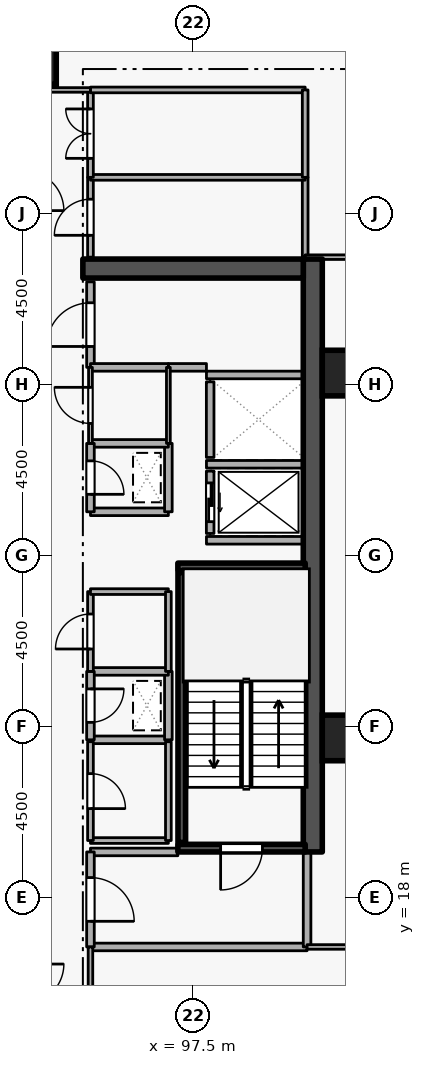
"""IFC4 building model, lengths in metres.
Left out: names, types, materials, properties, quantities, classifications, styles, units other than length and angle.
Written with IfcOpenShell. Run it as: python <this file> out.ifc"""

import sys

from ifc_helpers import new_model, si_unit, direction, frame, frame_2d, origin, origin_2d, place, context, subcontext, project, spatial, rectangle, extrude, element, fill, save


model = new_model("IFC4")
c1 = context("Model", 3, precision=1e-05, world=origin(), true_north=direction((0.0, 1.0)))
c2 = subcontext(c1, "Body", "Model", "MODEL_VIEW")
j1 = project(units=[si_unit("LENGTHUNIT", "METRE"), si_unit("PLANEANGLEUNIT", "RADIAN")], contexts=[c1])
p1 = place(None, origin())
s1 = spatial("IfcSite", under=j1, at=p1, CompositionType="ELEMENT")
p2 = place(p1, origin())
s2 = spatial("IfcBuilding", under=s1, at=p2, CompositionType="ELEMENT")
p3 = place(p2, frame((0.0, 0.0, 134.1)))
s3 = spatial("IfcBuildingStorey", under=s2, at=p3, CompositionType="ELEMENT", Elevation=134.1)
p4 = place(p3, frame((100.65, 19.2, 0.0), z_axis=(0.0, 0.0, 1.0), x_axis=(0.0, 1.0, 0.0)))
e1 = element("IfcWall", 1, at=p4, inside=s3, PredefinedType="SHEAR", context=c2, shape_type="SweptSolid", body=[
    extrude(rectangle(XDim=15.6, YDim=0.5, at=frame_2d((7.8, 0.0))), origin(), (0.0, 0.0, 1.0), 3.6),
])
p5 = place(p3, frame((94.6, 34.55, 0.0), z_axis=(0.0, 0.0, 1.0), x_axis=(1.0, 0.0, 0.0)))
e2 = element("IfcWall", 2, at=p5, inside=s3, PredefinedType="SHEAR", context=c2, shape_type="SweptSolid", body=[
    extrude(rectangle(XDim=5.8, YDim=0.5, at=frame_2d((2.9, 0.0))), origin(), (0.0, 0.0, 1.0), 3.6),
])
for number, where, z_axis, x_axis in (
    (3, (93.3, 40.0, 0.0), (0.0, 0.0, 1.0), (1.0, 0.0, 0.0)),
    (4, (101.5, 22.2, 0.0), (0.0, 0.0, 1.0), (1.0, 0.0, 0.0)),
    (5, (101.5, 31.8, 0.0), (0.0, 0.0, 1.0), (1.0, 0.0, 0.0)),
):
    element("IfcColumn", number, at=place(p3, frame(where, z_axis=z_axis, x_axis=x_axis)), inside=s3, PredefinedType="COLUMN", context=c2, shape_type="SweptSolid", body=[
        extrude(rectangle(XDim=1.2, YDim=1.2, at=origin_2d()), origin(), (0.0, 0.0, 1.0), 3.6),
    ])
p6 = place(p3, frame((97.95, 29.22, 0.0), z_axis=(0.0, 0.0, 1.0), x_axis=(0.0, -1.0, 0.0)))
e6 = element("IfcWall", 6, at=p6, inside=s3, PredefinedType="STANDARD", context=c2, shape_type="SweptSolid", body=[
    extrude(rectangle(XDim=1.64, YDim=0.2, at=frame_2d((0.82, 0.0))), origin(), (0.0, 0.0, 1.0), 3.34),
])
p7 = place(p6, frame((0.31, 0.0, 0.0)))
e7 = element("IfcOpeningElement", 7, at=p7, cuts=e6, PredefinedType="OPENING", context=c2, shape_type="SweptSolid", body=[
    extrude(rectangle(XDim=1.02, YDim=2.06, at=frame_2d((0.51, 1.03))), frame((0.0, 0.11, 0.0), z_axis=(0.0, -1.0, 0.0), x_axis=(1.0, 0.0, 0.0)), (0.0, 0.0, 1.0), 0.22),
])
p8 = place(p3, frame((97.95, 31.57, 0.0), z_axis=(0.0, 0.0, 1.0), x_axis=(0.0, -1.0, 0.0)))
e8 = element("IfcWall", 8, at=p8, inside=s3, PredefinedType="STANDARD", context=c2, shape_type="SweptSolid", body=[
    extrude(rectangle(XDim=1.99, YDim=0.2, at=frame_2d((0.995, 0.0))), origin(), (0.0, 0.0, 1.0), 3.34),
])
for number, where, z_axis, x_axis in (
    (9, (97.852, 29.4, 0.0), (0.0, 0.0, 1.0), (1.0, 0.0, 0.0)),
    (10, (97.852, 27.4, 0.0), (0.0, 0.0, 1.0), (1.0, 0.0, 0.0)),
    (11, (97.852, 31.75, 0.0), (0.0, 0.0, 1.0), (1.0, 0.0, 0.0)),
):
    element("IfcWall", number, at=place(p3, frame(where, z_axis=z_axis, x_axis=x_axis)), inside=s3, PredefinedType="STANDARD", context=c2, shape_type="SweptSolid", body=[
        extrude(rectangle(XDim=2.536, YDim=0.2, at=frame_2d((1.268, 0.0))), origin(), (0.0, 0.0, 1.0), 3.34),
    ])
p9 = place(p3, frame((100.45, 19.3, 0.0), z_axis=(0.0, 0.0, 1.0), x_axis=(-1.0, 0.0, 0.0)))
e12 = element("IfcWall", 12, at=p9, inside=s3, PredefinedType="SHEAR", context=c2, shape_type="SweptSolid", body=[
    extrude(rectangle(XDim=3.35, YDim=0.2, at=frame_2d((1.675, 0.0))), origin(), (0.0, 0.0, 1.0), 3.6),
])
p10 = place(p9, frame((1.125, 0.0, 0.0)))
e13 = element("IfcOpeningElement", 13, at=p10, cuts=e12, PredefinedType="OPENING", context=c2, shape_type="SweptSolid", body=[
    extrude(rectangle(XDim=1.1, YDim=2.1, at=frame_2d((0.55, 1.05))), frame((0.0, 0.11, 0.0), z_axis=(0.0, -1.0, 0.0), x_axis=(1.0, 0.0, 0.0)), (0.0, 0.0, 1.0), 0.22),
])
p11 = place(p3, frame((97.1, 26.7, 0.0), z_axis=(0.0, 0.0, 1.0), x_axis=(1.0, 0.0, 0.0)))
e14 = element("IfcWall", 14, at=p11, inside=s3, PredefinedType="SHEAR", context=c2, shape_type="SweptSolid", body=[
    extrude(rectangle(XDim=3.35, YDim=0.2, at=frame_2d((1.675, 0.0))), origin(), (0.0, 0.0, 1.0), 3.6),
])
p12 = place(p3, frame((97.203, 26.55, 0.0), z_axis=(0.0, 0.0, 1.0), x_axis=(0.0, -1.0, 0.0)))
e15 = element("IfcWall", 15, at=p12, inside=s3, PredefinedType="SHEAR", context=c2, shape_type="SweptSolid", body=[
    extrude(rectangle(XDim=7.1, YDim=0.2, at=frame_2d((3.55, 0.0))), origin(), (0.0, 0.0, 1.0), 3.6),
])
p13 = place(p3, frame((94.8, 16.7, 0.0), z_axis=(0.0, 0.0, 1.0), x_axis=(1.0, 0.0, 0.0)))
e16 = element("IfcWall", 16, at=p13, inside=s3, PredefinedType="STANDARD", context=c2, shape_type="SweptSolid", body=[
    extrude(rectangle(XDim=5.7, YDim=0.2, at=frame_2d((2.85, 0.0))), origin(), (0.0, 0.0, 1.0), 3.34),
])
p14 = place(p3, frame((100.5, 16.7, 0.0), z_axis=(0.0, 0.0, 1.0), x_axis=(0.0, 1.0, 0.0)))
e17 = element("IfcWall", 17, at=p14, inside=s3, PredefinedType="STANDARD", context=c2, shape_type="SweptSolid", body=[
    extrude(rectangle(XDim=2.5, YDim=0.2, at=frame_2d((1.25, 0.0))), origin(), (0.0, 0.0, 1.0), 3.34),
])
p15 = place(p3, frame((97.1, 19.2, 0.0), z_axis=(0.0, 0.0, 1.0), x_axis=(-1.0, 0.0, 0.0)))
e18 = element("IfcWall", 18, at=p15, inside=s3, PredefinedType="STANDARD", context=c2, shape_type="SweptSolid", body=[
    extrude(rectangle(XDim=2.3, YDim=0.2, at=frame_2d((1.15, 0.0))), origin(), (0.0, 0.0, 1.0), 2.545),
])
p16 = place(p3, frame((94.8, 19.2, 0.0), z_axis=(0.0, 0.0, 1.0), x_axis=(0.0, -1.0, 0.0)))
e19 = element("IfcWall", 19, at=p16, inside=s3, PredefinedType="STANDARD", context=c2, shape_type="SweptSolid", body=[
    extrude(rectangle(XDim=2.5, YDim=0.2, at=frame_2d((1.25, 0.0))), origin(), (0.0, 0.0, 1.0), 3.34),
])
p17 = place(p16, frame((0.675, 0.0, 0.0)))
e20 = element("IfcOpeningElement", 20, at=p17, cuts=e19, PredefinedType="OPENING", context=c2, shape_type="SweptSolid", body=[
    extrude(rectangle(XDim=1.15, YDim=2.1, at=frame_2d((0.575, 1.05))), frame((0.0, 0.11, 0.0), z_axis=(0.0, -1.0, 0.0), x_axis=(1.0, 0.0, 0.0)), (0.0, 0.0, 1.0), 0.22),
])
p18 = place(p3, frame((94.8, 28.15, 0.0), z_axis=(0.0, 0.0, 1.0), x_axis=(1.0, 0.0, 0.0)))
e21 = element("IfcWall", 21, at=p18, inside=s3, PredefinedType="STANDARD", context=c2, shape_type="SweptSolid", body=[
    extrude(rectangle(XDim=2.05, YDim=0.2, at=frame_2d((1.025, 0.0))), origin(), (0.0, 0.0, 1.0), 3.34),
])
p19 = place(p3, frame((96.85, 28.15, 0.0), z_axis=(0.0, 0.0, 1.0), x_axis=(0.0, 1.0, 0.0)))
e22 = element("IfcWall", 22, at=p19, inside=s3, PredefinedType="STANDARD", context=c2, shape_type="SweptSolid", body=[
    extrude(rectangle(XDim=1.8, YDim=0.2, at=frame_2d((0.9, 0.0))), origin(), (0.0, 0.0, 1.0), 3.34),
])
p20 = place(p3, frame((96.85, 29.95, 0.0), z_axis=(0.0, 0.0, 1.0), x_axis=(-1.0, 0.0, 0.0)))
e23 = element("IfcWall", 23, at=p20, inside=s3, PredefinedType="STANDARD", context=c2, shape_type="SweptSolid", body=[
    extrude(rectangle(XDim=2.05, YDim=0.2, at=frame_2d((1.025, 0.0))), origin(), (0.0, 0.0, 1.0), 3.34),
])
p21 = place(p3, frame((94.8, 29.95, 0.0), z_axis=(0.0, 0.0, 1.0), x_axis=(0.0, -1.0, 0.0)))
e24 = element("IfcWall", 24, at=p21, inside=s3, PredefinedType="STANDARD", context=c2, shape_type="SweptSolid", body=[
    extrude(rectangle(XDim=1.8, YDim=0.2, at=frame_2d((0.9, 0.0))), origin(), (0.0, 0.0, 1.0), 3.34),
])
p22 = place(p21, frame((0.46, 0.0, 0.0)))
e25 = element("IfcOpeningElement", 25, at=p22, cuts=e24, PredefinedType="OPENING", context=c2, shape_type="SweptSolid", body=[
    extrude(rectangle(XDim=0.88, YDim=2.04, at=frame_2d((0.44, 1.02))), frame((0.0, 0.11, 0.0), z_axis=(0.0, -1.0, 0.0), x_axis=(1.0, 0.0, 0.0)), (0.0, 0.0, 1.0), 0.22),
])
p23 = place(p3, frame((94.8, 22.15, 0.0), z_axis=(0.0, 0.0, 1.0), x_axis=(1.0, 0.0, 0.0)))
e26 = element("IfcWall", 26, at=p23, inside=s3, PredefinedType="STANDARD", context=c2, shape_type="SweptSolid", body=[
    extrude(rectangle(XDim=2.05, YDim=0.2, at=frame_2d((1.025, 0.0))), origin(), (0.0, 0.0, 1.0), 3.34),
])
p24 = place(p3, frame((96.85, 22.15, 0.0), z_axis=(0.0, 0.0, 1.0), x_axis=(0.0, 1.0, 0.0)))
e27 = element("IfcWall", 27, at=p24, inside=s3, PredefinedType="STANDARD", context=c2, shape_type="SweptSolid", body=[
    extrude(rectangle(XDim=1.8, YDim=0.2, at=frame_2d((0.9, 0.0))), origin(), (0.0, 0.0, 1.0), 3.34),
])
p25 = place(p3, frame((96.85, 23.95, 0.0), z_axis=(0.0, 0.0, 1.0), x_axis=(-1.0, 0.0, 0.0)))
e28 = element("IfcWall", 28, at=p25, inside=s3, PredefinedType="STANDARD", context=c2, shape_type="SweptSolid", body=[
    extrude(rectangle(XDim=2.05, YDim=0.2, at=frame_2d((1.025, 0.0))), origin(), (0.0, 0.0, 1.0), 3.34),
])
p26 = place(p3, frame((94.8, 23.95, 0.0), z_axis=(0.0, 0.0, 1.0), x_axis=(0.0, -1.0, 0.0)))
e29 = element("IfcWall", 29, at=p26, inside=s3, PredefinedType="STANDARD", context=c2, shape_type="SweptSolid", body=[
    extrude(rectangle(XDim=1.8, YDim=0.2, at=frame_2d((0.9, 0.0))), origin(), (0.0, 0.0, 1.0), 3.34),
])
p27 = place(p26, frame((0.46, 0.0, 0.0)))
e30 = element("IfcOpeningElement", 30, at=p27, cuts=e29, PredefinedType="OPENING", context=c2, shape_type="SweptSolid", body=[
    extrude(rectangle(XDim=0.88, YDim=2.04, at=frame_2d((0.44, 1.02))), frame((0.0, 0.11, 0.0), z_axis=(0.0, -1.0, 0.0), x_axis=(1.0, 0.0, 0.0)), (0.0, 0.0, 1.0), 0.22),
])
p28 = place(p3, frame((94.8, 31.95, 0.0), z_axis=(0.0, 0.0, 1.0), x_axis=(0.0, 1.0, 0.0)))
e31 = element("IfcWall", 31, at=p28, inside=s3, PredefinedType="STANDARD", context=c2, shape_type="SweptSolid", body=[
    extrude(rectangle(XDim=2.25, YDim=0.2, at=frame_2d((1.125, 0.0))), origin(), (0.0, 0.0, 1.0), 3.34),
])
p29 = place(p28, frame((0.55, 0.0, 0.0)))
e32 = element("IfcOpeningElement", 32, at=p29, cuts=e31, PredefinedType="OPENING", context=c2, shape_type="SweptSolid", body=[
    extrude(rectangle(XDim=1.15, YDim=2.1, at=frame_2d((0.575, 1.05))), frame((0.0, 0.11, 0.0), z_axis=(0.0, -1.0, 0.0), x_axis=(1.0, 0.0, 0.0)), (0.0, 0.0, 1.0), 0.22),
])
p30 = place(p3, frame((97.852, 31.95, 0.0), z_axis=(0.0, 0.0, 1.0), x_axis=(-1.0, 0.0, 0.0)))
e33 = element("IfcWall", 33, at=p30, inside=s3, PredefinedType="STANDARD", context=c2, shape_type="SweptSolid", body=[
    extrude(rectangle(XDim=1.002, YDim=0.2, at=frame_2d((0.501, 0.0))), origin(), (0.0, 0.0, 1.0), 3.34),
])
p31 = place(p3, frame((96.85, 31.95, 0.0), z_axis=(0.0, 0.0, 1.0), x_axis=(-1.0, 0.0, 0.0)))
e34 = element("IfcWall", 34, at=p31, inside=s3, PredefinedType="STANDARD", context=c2, shape_type="SweptSolid", body=[
    extrude(rectangle(XDim=2.05, YDim=0.2, at=frame_2d((1.025, 0.0))), origin(), (0.0, 0.0, 1.0), 3.34),
])
p32 = place(p3, frame((94.8, 19.5, 0.0), z_axis=(0.0, 0.0, 1.0), x_axis=(1.0, 0.0, 0.0)))
e35 = element("IfcWall", 35, at=p32, inside=s3, PredefinedType="PARTITIONING", context=c2, shape_type="SweptSolid", body=[
    extrude(rectangle(XDim=2.05, YDim=0.15, at=frame_2d((1.025, 0.0))), origin(), (0.0, 0.0, 1.0), 2.545),
])
p33 = place(p3, frame((96.85, 19.5, 0.0), z_axis=(0.0, 0.0, 1.0), x_axis=(0.0, 1.0, 0.0)))
e36 = element("IfcWall", 36, at=p33, inside=s3, PredefinedType="PARTITIONING", context=c2, shape_type="SweptSolid", body=[
    extrude(rectangle(XDim=2.6, YDim=0.15, at=frame_2d((1.3, 0.0))), origin(), (0.0, 0.0, 1.0), 3.34),
])
p34 = place(p3, frame((94.8, 22.1, 0.0), z_axis=(0.0, 0.0, 1.0), x_axis=(0.0, -1.0, 0.0)))
e37 = element("IfcWall", 37, at=p34, inside=s3, PredefinedType="PARTITIONING", context=c2, shape_type="SweptSolid", body=[
    extrude(rectangle(XDim=2.6, YDim=0.15, at=frame_2d((1.3, 0.0))), origin(), (0.0, 0.0, 1.0), 3.34),
])
p35 = place(p34, frame((0.84, 0.0, 0.0)))
e38 = element("IfcOpeningElement", 38, at=p35, cuts=e37, PredefinedType="OPENING", context=c2, shape_type="SweptSolid", body=[
    extrude(rectangle(XDim=0.92, YDim=2.08, at=frame_2d((0.46, 1.04))), frame((0.0, 0.085, 0.0), z_axis=(0.0, -1.0, 0.0), x_axis=(1.0, 0.0, 0.0)), (0.0, 0.0, 1.0), 0.17),
])
p36 = place(p3, frame((94.8, 23.95, 0.0), z_axis=(0.0, 0.0, 1.0), x_axis=(0.0, 1.0, 0.0)))
e39 = element("IfcWall", 39, at=p36, inside=s3, PredefinedType="PARTITIONING", context=c2, shape_type="SweptSolid", body=[
    extrude(rectangle(XDim=2.1, YDim=0.15, at=frame_2d((1.05, 0.0))), origin(), (0.0, 0.0, 1.0), 3.34),
])
p37 = place(p36, frame((0.59, 0.0, 0.0)))
e40 = element("IfcOpeningElement", 40, at=p37, cuts=e39, PredefinedType="OPENING", context=c2, shape_type="SweptSolid", body=[
    extrude(rectangle(XDim=0.92, YDim=2.08, at=frame_2d((0.46, 1.04))), frame((0.0, 0.085, 0.0), z_axis=(0.0, -1.0, 0.0), x_axis=(1.0, 0.0, 0.0)), (0.0, 0.0, 1.0), 0.17),
])
p38 = place(p3, frame((94.8, 26.05, 0.0), z_axis=(0.0, 0.0, 1.0), x_axis=(1.0, 0.0, 0.0)))
e41 = element("IfcWall", 41, at=p38, inside=s3, PredefinedType="PARTITIONING", context=c2, shape_type="SweptSolid", body=[
    extrude(rectangle(XDim=2.05, YDim=0.15, at=frame_2d((1.025, 0.0))), origin(), (0.0, 0.0, 1.0), 3.34),
])
p39 = place(p3, frame((96.85, 26.05, 0.0), z_axis=(0.0, 0.0, 1.0), x_axis=(0.0, -1.0, 0.0)))
e42 = element("IfcWall", 42, at=p39, inside=s3, PredefinedType="PARTITIONING", context=c2, shape_type="SweptSolid", body=[
    extrude(rectangle(XDim=2.1, YDim=0.15, at=frame_2d((1.05, 0.0))), origin(), (0.0, 0.0, 1.0), 3.34),
])
p40 = place(p3, frame((94.8, 29.95, 0.0), z_axis=(0.0, 0.0, 1.0), x_axis=(0.0, 1.0, 0.0)))
e43 = element("IfcWall", 43, at=p40, inside=s3, PredefinedType="PARTITIONING", context=c2, shape_type="SweptSolid", body=[
    extrude(rectangle(XDim=2.0, YDim=0.1, at=frame_2d((1.0, 0.0))), origin(), (0.0, 0.0, 1.0), 3.34),
])
p41 = place(p40, frame((0.525, 0.0, 0.0)))
e44 = element("IfcOpeningElement", 44, at=p41, cuts=e43, PredefinedType="OPENING", context=c2, shape_type="SweptSolid", body=[
    extrude(rectangle(XDim=0.95, YDim=2.1, at=frame_2d((0.475, 1.05))), frame((0.0, 0.06, 0.0), z_axis=(0.0, -1.0, 0.0), x_axis=(1.0, 0.0, 0.0)), (0.0, 0.0, 1.0), 0.12),
])
p42 = place(p3, frame((96.85, 31.95, 0.0), z_axis=(0.0, 0.0, 1.0), x_axis=(0.0, -1.0, 0.0)))
e45 = element("IfcWall", 45, at=p42, inside=s3, PredefinedType="PARTITIONING", context=c2, shape_type="SweptSolid", body=[
    extrude(rectangle(XDim=2.0, YDim=0.1, at=frame_2d((1.0, 0.0))), origin(), (0.0, 0.0, 1.0), 3.34),
])
p43 = place(p3, frame((100.45, 36.95, 0.0), z_axis=(0.0, 0.0, 1.0), x_axis=(0.0, -1.0, 0.0)))
e46 = element("IfcWall", 46, at=p43, inside=s3, PredefinedType="PARTITIONING", context=c2, shape_type="SweptSolid", body=[
    extrude(rectangle(XDim=2.1, YDim=0.15, at=frame_2d((1.05, 0.0))), origin(), (0.0, 0.0, 1.0), 3.34),
])
p44 = place(p3, frame((94.8, 34.85, 0.0), z_axis=(0.0, 0.0, 1.0), x_axis=(0.0, 1.0, 0.0)))
e47 = element("IfcWall", 47, at=p44, inside=s3, PredefinedType="PARTITIONING", context=c2, shape_type="SweptSolid", body=[
    extrude(rectangle(XDim=2.1, YDim=0.15, at=frame_2d((1.05, 0.0))), origin(), (0.0, 0.0, 1.0), 3.34),
])
p45 = place(p44, frame((0.575, 0.0, 0.0)))
e48 = element("IfcOpeningElement", 48, at=p45, cuts=e47, PredefinedType="OPENING", context=c2, shape_type="SweptSolid", body=[
    extrude(rectangle(XDim=0.95, YDim=2.1, at=frame_2d((0.475, 1.05))), frame((0.0, 0.085, 0.0), z_axis=(0.0, -1.0, 0.0), x_axis=(1.0, 0.0, 0.0)), (0.0, 0.0, 1.0), 0.17),
])
p46 = place(p3, frame((94.8, 36.95, 0.0), z_axis=(0.0, 0.0, 1.0), x_axis=(1.0, 0.0, 0.0)))
e49 = element("IfcWall", 49, at=p46, inside=s3, PredefinedType="PARTITIONING", context=c2, shape_type="SweptSolid", body=[
    extrude(rectangle(XDim=5.65, YDim=0.15, at=frame_2d((2.825, 0.0))), origin(), (0.0, 0.0, 1.0), 3.34),
])
p47 = place(p3, frame((94.8, 36.95, 0.0), z_axis=(0.0, 0.0, 1.0), x_axis=(0.0, 1.0, 0.0)))
e50 = element("IfcWall", 50, at=p47, inside=s3, PredefinedType="PARTITIONING", context=c2, shape_type="SweptSolid", body=[
    extrude(rectangle(XDim=2.3, YDim=0.15, at=frame_2d((1.15, 0.0))), origin(), (0.0, 0.0, 1.0), 3.34),
])
p48 = place(p47, frame((0.5, 0.0, 0.0)))
e51 = element("IfcOpeningElement", 51, at=p48, cuts=e50, PredefinedType="OPENING", context=c2, shape_type="SweptSolid", body=[
    extrude(rectangle(XDim=1.3, YDim=2.12, at=frame_2d((0.65, 1.06))), frame((0.0, 0.085, 0.0), z_axis=(0.0, -1.0, 0.0), x_axis=(1.0, 0.0, 0.0)), (0.0, 0.0, 1.0), 0.17),
])
p49 = place(p3, frame((94.8, 39.25, 0.0), z_axis=(0.0, 0.0, 1.0), x_axis=(1.0, 0.0, 0.0)))
e52 = element("IfcWall", 52, at=p49, inside=s3, PredefinedType="PARTITIONING", context=c2, shape_type="SweptSolid", body=[
    extrude(rectangle(XDim=5.65, YDim=0.15, at=frame_2d((2.825, 0.0))), origin(), (0.0, 0.0, 1.0), 3.34),
])
p50 = place(p3, frame((100.45, 39.25, 0.0), z_axis=(0.0, 0.0, 1.0), x_axis=(0.0, -1.0, 0.0)))
e53 = element("IfcWall", 53, at=p50, inside=s3, PredefinedType="PARTITIONING", context=c2, shape_type="SweptSolid", body=[
    extrude(rectangle(XDim=2.3, YDim=0.15, at=frame_2d((1.15, 0.0))), origin(), (0.0, 0.0, 1.0), 3.34),
])
p51 = place(p3, frame((94.8, 14.75, 0.0), z_axis=(0.0, 0.0, 1.0), x_axis=(0.0, 1.0, 0.0)))
e54 = element("IfcWall", 54, at=p51, inside=s3, PredefinedType="PARTITIONING", context=c2, shape_type="SweptSolid", body=[
    extrude(rectangle(XDim=1.95, YDim=0.12, at=frame_2d((0.975, 0.0))), origin(), (0.0, 0.0, 1.0), 3.34),
])
p52 = place(p3, frame((100.5, 16.7, 0.0), z_axis=(0.0, 0.0, 1.0), x_axis=(1.0, 0.0, 0.0)))
e55 = element("IfcWall", 55, at=p52, inside=s3, PredefinedType="PARTITIONING", context=c2, shape_type="SweptSolid", body=[
    extrude(rectangle(XDim=11.72, YDim=0.12, at=frame_2d((5.86, 0.0))), origin(), (0.0, 0.0, 1.0), 3.34),
])
p53 = place(p3, frame((94.8, 39.25, 0.0), z_axis=(0.0, 0.0, 1.0), x_axis=(-1.0, 0.0, 0.0)))
e56 = element("IfcWall", 56, at=p53, inside=s3, PredefinedType="PARTITIONING", context=c2, shape_type="SweptSolid", body=[
    extrude(rectangle(XDim=1.75, YDim=0.12, at=frame_2d((0.875, 0.0))), origin(), (0.0, 0.0, 1.0), 3.34),
])
p54 = place(p3, frame((112.22, 34.85, 0.0), z_axis=(0.0, 0.0, 1.0), x_axis=(-1.0, 0.0, 0.0)))
e57 = element("IfcWall", 57, at=p54, inside=s3, PredefinedType="PARTITIONING", context=c2, shape_type="SweptSolid", body=[
    extrude(rectangle(XDim=11.77, YDim=0.12, at=frame_2d((5.885, 0.0))), origin(), (0.0, 0.0, 1.0), 2.545),
])
p55 = place(p7, origin())
e58 = element("IfcDoor", 58, at=p55, inside=s3, OperationType="SLIDING_TO_LEFT", PredefinedType="DOOR", context=c2, shape_type="SweptSolid", body=[
    extrude(rectangle(XDim=1.02, YDim=2.06, at=frame_2d((0.51, 1.03))), frame((0.0, 0.025, 0.0), z_axis=(0.0, -1.0, 0.0), x_axis=(1.0, 0.0, 0.0)), (0.0, 0.0, 1.0), 0.05),
])
fill(e7, e58)
p56 = place(p10, origin())
e59 = element("IfcDoor", 59, at=p56, inside=s3, OperationType="SINGLE_SWING_RIGHT", PredefinedType="DOOR", context=c2, shape_type="SweptSolid", body=[
    extrude(rectangle(XDim=1.1, YDim=2.1, at=frame_2d((0.55, 1.05))), frame((0.0, 0.025, 0.0), z_axis=(0.0, -1.0, 0.0), x_axis=(1.0, 0.0, 0.0)), (0.0, 0.0, 1.0), 0.05),
])
fill(e13, e59)
p57 = place(p17, origin())
e60 = element("IfcDoor", 60, at=p57, inside=s3, OperationType="SINGLE_SWING_RIGHT", PredefinedType="DOOR", context=c2, shape_type="SweptSolid", body=[
    extrude(rectangle(XDim=1.15, YDim=2.1, at=frame_2d((0.575, 1.05))), frame((0.0, 0.025, 0.0), z_axis=(0.0, -1.0, 0.0), x_axis=(1.0, 0.0, 0.0)), (0.0, 0.0, 1.0), 0.05),
])
fill(e20, e60)
p58 = place(p22, origin())
e61 = element("IfcDoor", 61, at=p58, inside=s3, OperationType="SINGLE_SWING_RIGHT", PredefinedType="DOOR", context=c2, shape_type="SweptSolid", body=[
    extrude(rectangle(XDim=0.88, YDim=2.04, at=frame_2d((0.44, 1.02))), frame((0.0, 0.025, 0.0), z_axis=(0.0, -1.0, 0.0), x_axis=(1.0, 0.0, 0.0)), (0.0, 0.0, 1.0), 0.05),
])
fill(e25, e61)
p59 = place(p27, origin())
e62 = element("IfcDoor", 62, at=p59, inside=s3, OperationType="SINGLE_SWING_LEFT", PredefinedType="DOOR", context=c2, shape_type="SweptSolid", body=[
    extrude(rectangle(XDim=0.88, YDim=2.04, at=frame_2d((0.44, 1.02))), frame((0.0, 0.025, 0.0), z_axis=(0.0, -1.0, 0.0), x_axis=(1.0, 0.0, 0.0)), (0.0, 0.0, 1.0), 0.05),
])
fill(e30, e62)
p60 = place(p35, origin())
e63 = element("IfcDoor", 63, at=p60, inside=s3, OperationType="SINGLE_SWING_RIGHT", PredefinedType="DOOR", context=c2, shape_type="SweptSolid", body=[
    extrude(rectangle(XDim=0.92, YDim=2.08, at=frame_2d((0.46, 1.04))), frame((0.0, 0.025, 0.0), z_axis=(0.0, -1.0, 0.0), x_axis=(1.0, 0.0, 0.0)), (0.0, 0.0, 1.0), 0.05),
])
fill(e38, e63)
p61 = place(p37, origin())
e64 = element("IfcDoor", 64, at=p61, inside=s3, OperationType="SINGLE_SWING_LEFT", PredefinedType="DOOR", context=c2, shape_type="SweptSolid", body=[
    extrude(rectangle(XDim=0.92, YDim=2.08, at=frame_2d((0.46, 1.04))), frame((0.0, 0.025, 0.0), z_axis=(0.0, -1.0, 0.0), x_axis=(1.0, 0.0, 0.0)), (0.0, 0.0, 1.0), 0.05),
])
fill(e40, e64)
p62 = place(p41, origin())
e65 = element("IfcDoor", 65, at=p62, inside=s3, OperationType="SINGLE_SWING_RIGHT", PredefinedType="DOOR", context=c2, shape_type="SweptSolid", body=[
    extrude(rectangle(XDim=0.95, YDim=2.1, at=frame_2d((0.475, 1.05))), frame((0.0, 0.025, 0.0), z_axis=(0.0, -1.0, 0.0), x_axis=(1.0, 0.0, 0.0)), (0.0, 0.0, 1.0), 0.05),
])
fill(e44, e65)
p63 = place(p29, origin())
e66 = element("IfcDoor", 66, at=p63, inside=s3, OperationType="SINGLE_SWING_LEFT", PredefinedType="DOOR", context=c2, shape_type="SweptSolid", body=[
    extrude(rectangle(XDim=1.15, YDim=2.1, at=frame_2d((0.575, 1.05))), frame((0.0, 0.025, 0.0), z_axis=(0.0, -1.0, 0.0), x_axis=(1.0, 0.0, 0.0)), (0.0, 0.0, 1.0), 0.05),
])
fill(e32, e66)
p64 = place(p45, origin())
e67 = element("IfcDoor", 67, at=p64, inside=s3, OperationType="SINGLE_SWING_LEFT", PredefinedType="DOOR", context=c2, shape_type="SweptSolid", body=[
    extrude(rectangle(XDim=0.95, YDim=2.1, at=frame_2d((0.475, 1.05))), frame((0.0, 0.025, 0.0), z_axis=(0.0, -1.0, 0.0), x_axis=(1.0, 0.0, 0.0)), (0.0, 0.0, 1.0), 0.05),
])
fill(e48, e67)
p65 = place(p48, origin())
e68 = element("IfcDoor", 68, at=p65, inside=s3, OperationType="DOUBLE_DOOR_SINGLE_SWING", PredefinedType="DOOR", context=c2, shape_type="SweptSolid", body=[
    extrude(rectangle(XDim=1.3, YDim=2.12, at=frame_2d((0.65, 1.06))), frame((0.0, 0.025, 0.0), z_axis=(0.0, -1.0, 0.0), x_axis=(1.0, 0.0, 0.0)), (0.0, 0.0, 1.0), 0.05),
])
fill(e51, e68)
save(model, sys.argv[1])
